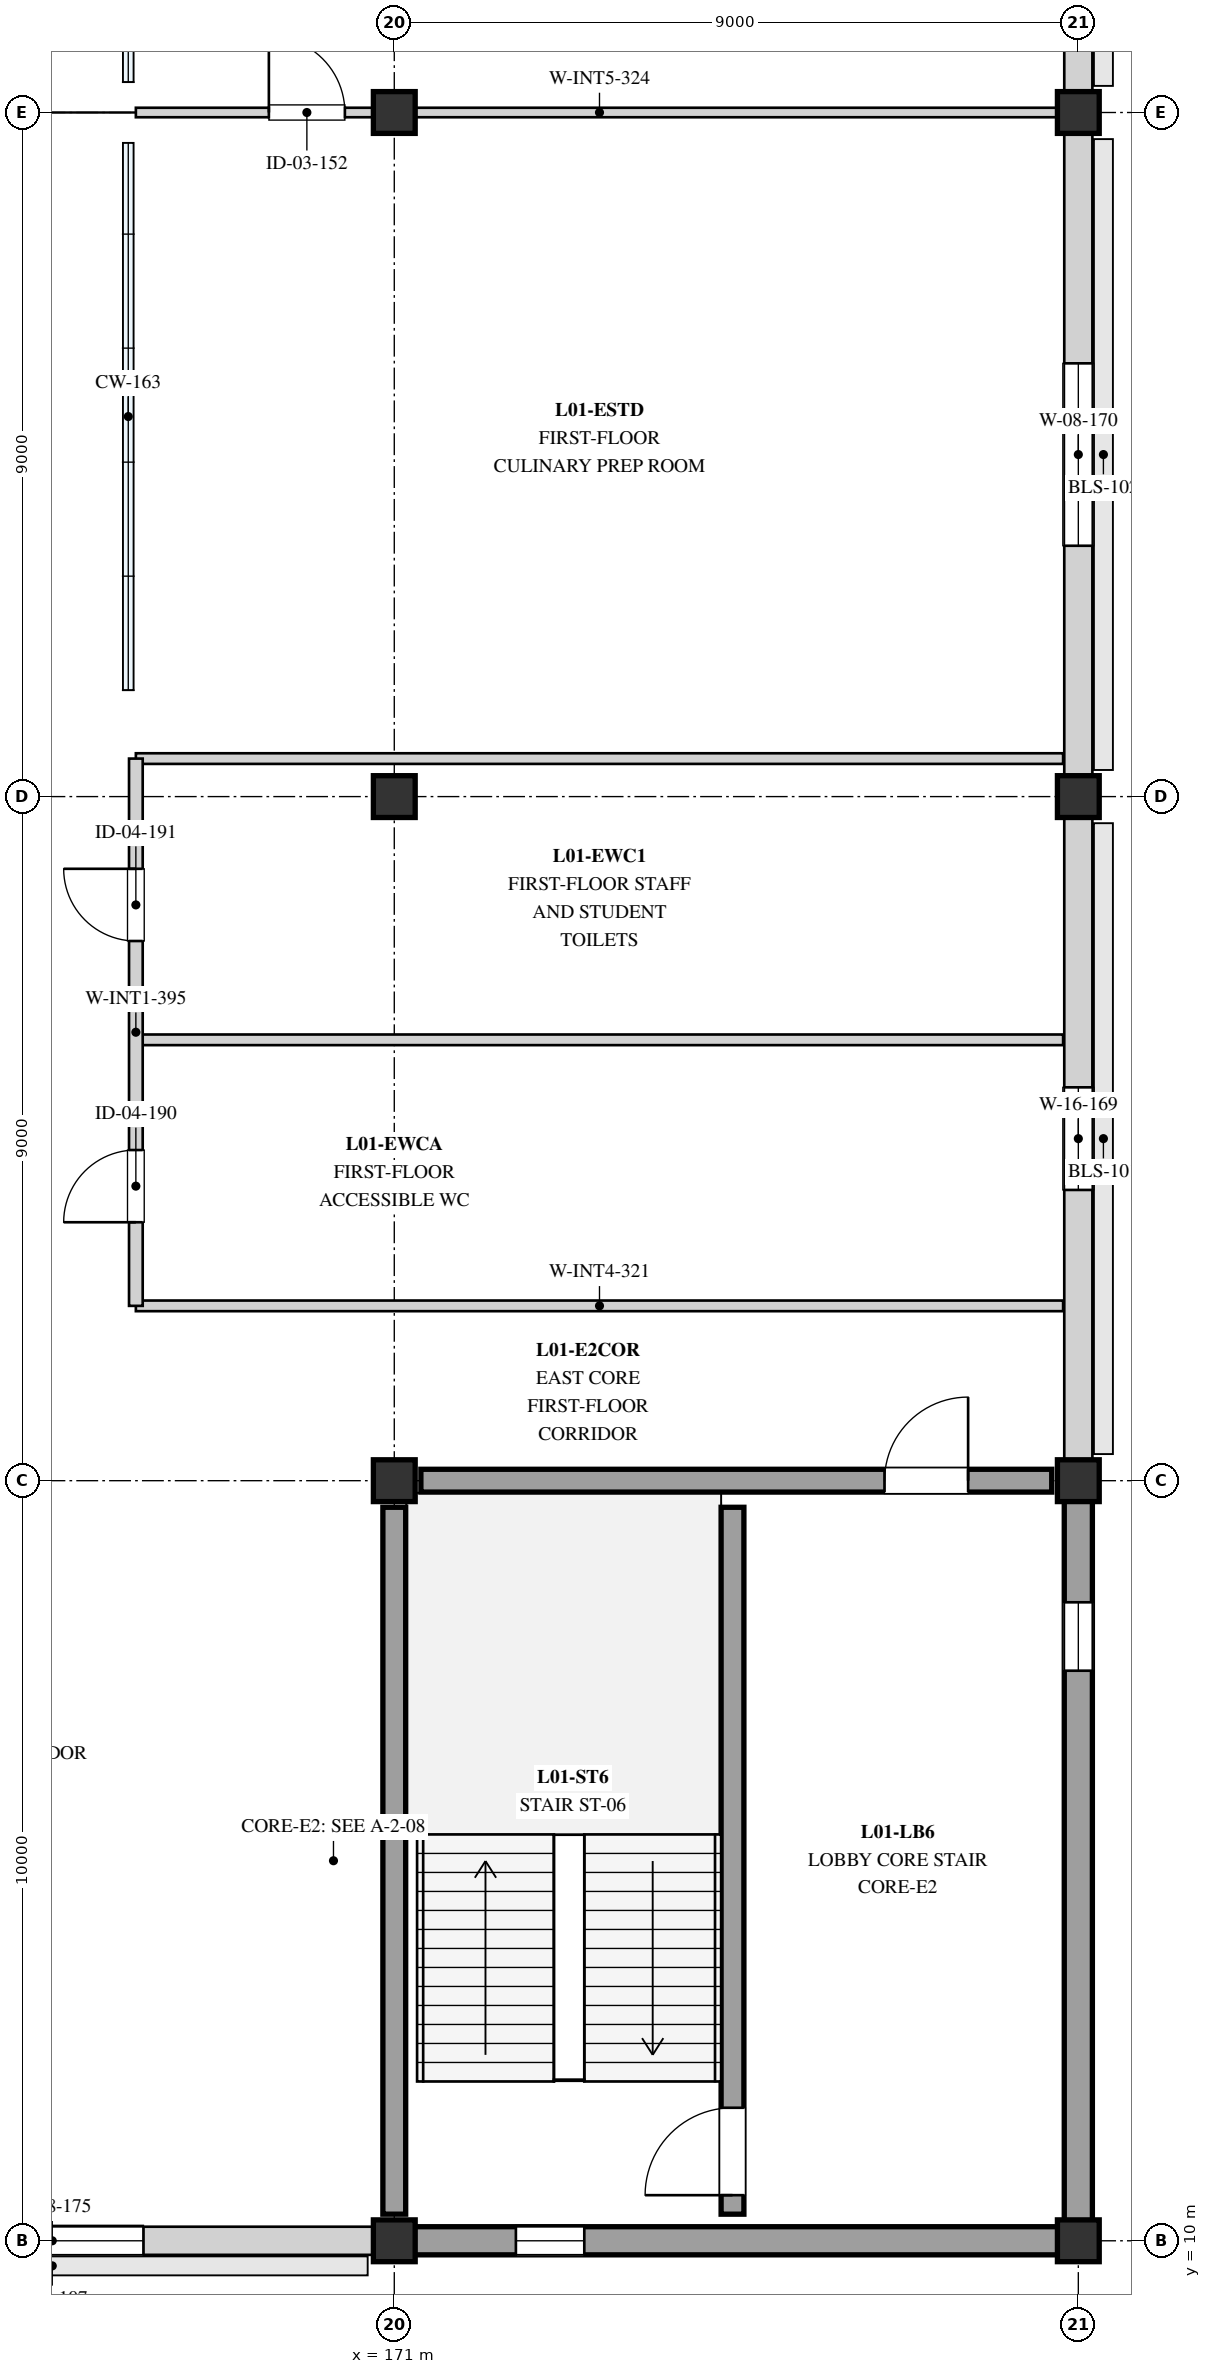
"""IFC4 building model, lengths in metres.
Left out: names, types, materials, properties, quantities, classifications, styles, units other than length and angle.
Written with IfcOpenShell. Run it as: python <this file> out.ifc"""

import sys

from ifc_helpers import new_model, si_unit, direction, frame, frame_2d, origin, origin_2d, place, context, subcontext, project, spatial, rectangle, extrude, element, fill, save


model = new_model("IFC4")
c1 = context("Model", 3, precision=1e-05, world=origin(), true_north=direction((0.0, 1.0)))
c2 = subcontext(c1, "Body", "Model", "MODEL_VIEW")
j1 = project(units=[si_unit("LENGTHUNIT", "METRE"), si_unit("PLANEANGLEUNIT", "RADIAN")], contexts=[c1])
p1 = place(None, origin())
s1 = spatial("IfcSite", under=j1, at=p1, CompositionType="ELEMENT")
p2 = place(p1, origin())
s2 = spatial("IfcBuilding", under=s1, at=p2, CompositionType="ELEMENT")
p3 = place(p2, frame((0.0, 0.0, 4.5)))
s3 = spatial("IfcBuildingStorey", under=s2, at=p3, CompositionType="ELEMENT", Elevation=4.5)
for number, where, z_axis, x_axis in (
    (1, (171.0, 10.0, 0.0), (0.0, 0.0, 1.0), (1.0, 0.0, 0.0)),
    (2, (171.0, 20.0, 0.0), (0.0, 0.0, 1.0), (1.0, 0.0, 0.0)),
    (3, (171.0, 29.0, 0.0), (0.0, 0.0, 1.0), (1.0, 0.0, 0.0)),
    (4, (171.0, 38.0, 0.0), (0.0, 0.0, 1.0), (1.0, 0.0, 0.0)),
    (5, (180.0, 10.0, 0.0), (0.0, 0.0, 1.0), (1.0, 0.0, 0.0)),
    (6, (180.0, 20.0, 0.0), (0.0, 0.0, 1.0), (1.0, 0.0, 0.0)),
    (7, (180.0, 29.0, 0.0), (0.0, 0.0, 1.0), (1.0, 0.0, 0.0)),
    (8, (180.0, 38.0, 0.0), (0.0, 0.0, 1.0), (1.0, 0.0, 0.0)),
):
    element("IfcColumn", number, at=place(p3, frame(where, z_axis=z_axis, x_axis=x_axis)), inside=s3, PredefinedType="COLUMN", context=c2, shape_type="SweptSolid", body=[
        extrude(rectangle(XDim=0.55, YDim=0.55, at=origin_2d()), origin(), (0.0, 0.0, 1.0), 3.9),
    ])
p4 = place(p3, frame((180.0, 20.0, 0.0), z_axis=(0.0, 0.0, 1.0), x_axis=(0.0, -1.0, 0.0)))
e9 = element("IfcWall", 9, at=p4, inside=s3, PredefinedType="STANDARD", context=c2, shape_type="SweptSolid", body=[
    extrude(rectangle(XDim=10.0, YDim=0.37, at=frame_2d((5.0, 0.0))), origin(), (0.0, 0.0, 1.0), 3.65),
])
p5 = place(p4, frame((1.6, 0.0, 0.35)))
e10 = element("IfcOpeningElement", 10, at=p5, cuts=e9, PredefinedType="OPENING", context=c2, shape_type="SweptSolid", body=[
    extrude(rectangle(XDim=0.9, YDim=2.24, at=frame_2d((0.45, 1.12))), frame((0.0, 0.195, 0.0), z_axis=(0.0, -1.0, 0.0), x_axis=(1.0, 0.0, 0.0)), (0.0, 0.0, 1.0), 0.39),
])
p6 = place(p3, frame((180.0, 20.0, 0.0), z_axis=(0.0, 0.0, 1.0), x_axis=(0.0, 1.0, 0.0)))
e11 = element("IfcWall", 11, at=p6, inside=s3, PredefinedType="STANDARD", context=c2, shape_type="SweptSolid", body=[
    extrude(rectangle(XDim=9.0, YDim=0.37, at=frame_2d((4.5, 0.0))), origin(), (0.0, 0.0, 1.0), 2.78),
])
p7 = place(p6, frame((3.825, 0.0, 0.9)))
e12 = element("IfcOpeningElement", 12, at=p7, cuts=e11, PredefinedType="OPENING", context=c2, shape_type="SweptSolid", body=[
    extrude(rectangle(XDim=1.35, YDim=1.6, at=frame_2d((0.675, 0.8))), frame((0.0, 0.195, 0.0), z_axis=(0.0, -1.0, 0.0), x_axis=(1.0, 0.0, 0.0)), (0.0, 0.0, 1.0), 0.39),
])
p8 = place(p3, frame((180.0, 29.0, 0.0), z_axis=(0.0, 0.0, 1.0), x_axis=(0.0, 1.0, 0.0)))
e13 = element("IfcWall", 13, at=p8, inside=s3, PredefinedType="STANDARD", context=c2, shape_type="SweptSolid", body=[
    extrude(rectangle(XDim=9.0, YDim=0.37, at=frame_2d((4.5, 0.0))), origin(), (0.0, 0.0, 1.0), 2.78),
])
p9 = place(p8, frame((3.3, 0.0, 0.59)))
e14 = element("IfcOpeningElement", 14, at=p9, cuts=e13, PredefinedType="OPENING", context=c2, shape_type="SweptSolid", body=[
    extrude(rectangle(XDim=2.4, YDim=2.0, at=frame_2d((1.2, 1.0))), frame((0.0, 0.195, 0.0), z_axis=(0.0, -1.0, 0.0), x_axis=(1.0, 0.0, 0.0)), (0.0, 0.0, 1.0), 0.39),
])
p10 = place(p3, frame((180.0, 38.0, 0.0), z_axis=(0.0, 0.0, 1.0), x_axis=(0.0, 1.0, 0.0)))
e15 = element("IfcWall", 15, at=p10, inside=s3, PredefinedType="STANDARD", context=c2, shape_type="SweptSolid", body=[
    extrude(rectangle(XDim=9.0, YDim=0.37, at=frame_2d((4.5, 0.0))), origin(), (0.0, 0.0, 1.0), 2.78),
])
p11 = place(p10, frame((3.6, 0.0, 0.59)))
e16 = element("IfcOpeningElement", 16, at=p11, cuts=e15, PredefinedType="OPENING", context=c2, shape_type="SweptSolid", body=[
    extrude(rectangle(XDim=1.8, YDim=2.0, at=frame_2d((0.9, 1.0))), frame((0.0, 0.195, 0.0), z_axis=(0.0, -1.0, 0.0), x_axis=(1.0, 0.0, 0.0)), (0.0, 0.0, 1.0), 0.39),
])
p12 = place(p3, frame((162.0, 10.0, 0.0), z_axis=(0.0, 0.0, 1.0), x_axis=(1.0, 0.0, 0.0)))
e17 = element("IfcWall", 17, at=p12, inside=s3, PredefinedType="STANDARD", context=c2, shape_type="SweptSolid", body=[
    extrude(rectangle(XDim=9.0, YDim=0.37, at=frame_2d((4.5, 0.0))), origin(), (0.0, 0.0, 1.0), 2.78),
])
p13 = place(p12, frame((3.3, 0.0, 0.59)))
e18 = element("IfcOpeningElement", 18, at=p13, cuts=e17, PredefinedType="OPENING", context=c2, shape_type="SweptSolid", body=[
    extrude(rectangle(XDim=2.4, YDim=2.0, at=frame_2d((1.2, 1.0))), frame((0.0, 0.195, 0.0), z_axis=(0.0, -1.0, 0.0), x_axis=(1.0, 0.0, 0.0)), (0.0, 0.0, 1.0), 0.39),
])
p14 = place(p3, frame((171.0, 10.0, 0.0), z_axis=(0.0, 0.0, 1.0), x_axis=(1.0, 0.0, 0.0)))
e19 = element("IfcWall", 19, at=p14, inside=s3, PredefinedType="STANDARD", context=c2, shape_type="SweptSolid", body=[
    extrude(rectangle(XDim=9.0, YDim=0.37, at=frame_2d((4.5, 0.0))), origin(), (0.0, 0.0, 1.0), 3.65),
])
p15 = place(p14, frame((1.6, 0.0, 0.35)))
e20 = element("IfcOpeningElement", 20, at=p15, cuts=e19, PredefinedType="OPENING", context=c2, shape_type="SweptSolid", body=[
    extrude(rectangle(XDim=0.9, YDim=2.24, at=frame_2d((0.45, 1.12))), frame((0.0, 0.195, 0.0), z_axis=(0.0, -1.0, 0.0), x_axis=(1.0, 0.0, 0.0)), (0.0, 0.0, 1.0), 0.39),
])
p16 = place(p3, frame((175.45, 10.35, 0.0), z_axis=(0.0, 0.0, 1.0), x_axis=(0.0, 1.0, 0.0)))
e21 = element("IfcWall", 21, at=p16, inside=s3, PredefinedType="SHEAR", context=c2, shape_type="SweptSolid", body=[
    extrude(rectangle(XDim=9.3, YDim=0.3, at=frame_2d((4.65, 0.0))), origin(), (0.0, 0.0, 1.0), 3.62),
])
p17 = place(p16, frame((0.25, 0.0, 0.0)))
e22 = element("IfcOpeningElement", 22, at=p17, cuts=e21, PredefinedType="OPENING", context=c2, shape_type="SweptSolid", body=[
    extrude(rectangle(XDim=1.15, YDim=2.15, at=frame_2d((0.575, 1.075))), frame((0.0, 0.16, 0.0), z_axis=(0.0, -1.0, 0.0), x_axis=(1.0, 0.0, 0.0)), (0.0, 0.0, 1.0), 0.32),
])
p18 = place(p3, frame((171.0, 10.35, 0.0), z_axis=(0.0, 0.0, 1.0), x_axis=(0.0, 1.0, 0.0)))
e23 = element("IfcWall", 23, at=p18, inside=s3, PredefinedType="SHEAR", context=c2, shape_type="SweptSolid", body=[
    extrude(rectangle(XDim=9.3, YDim=0.3, at=frame_2d((4.65, 0.0))), origin(), (0.0, 0.0, 1.0), 3.62),
])
p19 = place(p3, frame((171.35, 20.0, 0.0), z_axis=(0.0, 0.0, 1.0), x_axis=(1.0, 0.0, 0.0)))
e24 = element("IfcWall", 24, at=p19, inside=s3, PredefinedType="SHEAR", context=c2, shape_type="SweptSolid", body=[
    extrude(rectangle(XDim=8.3, YDim=0.3, at=frame_2d((4.15, 0.0))), origin(), (0.0, 0.0, 1.0), 3.62),
])
p20 = place(p19, frame((6.1, 0.0, 0.0)))
e25 = element("IfcOpeningElement", 25, at=p20, cuts=e24, PredefinedType="OPENING", context=c2, shape_type="SweptSolid", body=[
    extrude(rectangle(XDim=1.1, YDim=2.1, at=frame_2d((0.55, 1.05))), frame((0.0, 0.16, 0.0), z_axis=(0.0, -1.0, 0.0), x_axis=(1.0, 0.0, 0.0)), (0.0, 0.0, 1.0), 0.32),
])
for number, where, z_axis, x_axis in (
    (26, (167.6, 22.3, 0.0), (0.0, 0.0, 1.0), (1.0, 0.0, 0.0)),
    (27, (167.6, 25.8, 0.0), (0.0, 0.0, 1.0), (1.0, 0.0, 0.0)),
    (28, (167.6, 29.5, 0.0), (0.0, 0.0, 1.0), (1.0, 0.0, 0.0)),
):
    element("IfcWall", number, at=place(p3, frame(where, z_axis=z_axis, x_axis=x_axis)), inside=s3, PredefinedType="PARTITIONING", context=c2, shape_type="SweptSolid", body=[
        extrude(rectangle(XDim=12.2, YDim=0.14, at=frame_2d((6.1, 0.0))), origin(), (0.0, 0.0, 1.0), 2.65),
    ])
p21 = place(p3, frame((167.6, 38.0, 0.0), z_axis=(0.0, 0.0, 1.0), x_axis=(1.0, 0.0, 0.0)))
e29 = element("IfcWall", 29, at=p21, inside=s3, PredefinedType="PARTITIONING", context=c2, shape_type="SweptSolid", body=[
    extrude(rectangle(XDim=12.2, YDim=0.125, at=frame_2d((6.1, 0.0))), origin(), (0.0, 0.0, 1.0), 2.65),
])
p22 = place(p21, frame((1.75, 0.0, 0.0)))
e30 = element("IfcOpeningElement", 30, at=p22, cuts=e29, PredefinedType="OPENING", context=c2, shape_type="SweptSolid", body=[
    extrude(rectangle(XDim=1.0, YDim=2.1, at=frame_2d((0.5, 1.05))), frame((0.0, 0.073, 0.0), z_axis=(0.0, -1.0, 0.0), x_axis=(1.0, 0.0, 0.0)), (0.0, 0.0, 1.0), 0.145),
])
p23 = place(p3, frame((167.6, 22.3, 0.0), z_axis=(0.0, 0.0, 1.0), x_axis=(0.0, 1.0, 0.0)))
e31 = element("IfcWall", 31, at=p23, inside=s3, PredefinedType="STANDARD", context=c2, shape_type="SweptSolid", body=[
    extrude(rectangle(XDim=7.2, YDim=0.18, at=frame_2d((3.6, 0.0))), origin(), (0.0, 0.0, 1.0), 2.65),
])
p24 = place(p23, frame((1.1, 0.0, 0.0)))
e32 = element("IfcOpeningElement", 32, at=p24, cuts=e31, PredefinedType="OPENING", context=c2, shape_type="SweptSolid", body=[
    extrude(rectangle(XDim=0.95, YDim=2.1, at=frame_2d((0.475, 1.05))), frame((0.0, 0.1, 0.0), z_axis=(0.0, -1.0, 0.0), x_axis=(1.0, 0.0, 0.0)), (0.0, 0.0, 1.0), 0.2),
])
p25 = place(p23, frame((4.8, 0.0, 0.0)))
e33 = element("IfcOpeningElement", 33, at=p25, cuts=e31, PredefinedType="OPENING", context=c2, shape_type="SweptSolid", body=[
    extrude(rectangle(XDim=0.95, YDim=2.1, at=frame_2d((0.475, 1.05))), frame((0.0, 0.1, 0.0), z_axis=(0.0, -1.0, 0.0), x_axis=(1.0, 0.0, 0.0)), (0.0, 0.0, 1.0), 0.2),
])
p26 = place(p5, origin())
e34 = element("IfcWindow", 34, at=p26, inside=s3, PartitioningType="SINGLE_PANEL", PredefinedType="WINDOW", context=c2, shape_type="SweptSolid", body=[
    extrude(rectangle(XDim=0.9, YDim=2.24, at=frame_2d((0.45, 1.12))), frame((0.0, 0.03, 0.0), z_axis=(0.0, -1.0, 0.0), x_axis=(1.0, 0.0, 0.0)), (0.0, 0.0, 1.0), 0.06),
])
fill(e10, e34)
p27 = place(p7, origin())
e35 = element("IfcWindow", 35, at=p27, inside=s3, PartitioningType="SINGLE_PANEL", PredefinedType="WINDOW", context=c2, shape_type="SweptSolid", body=[
    extrude(rectangle(XDim=1.35, YDim=1.6, at=frame_2d((0.675, 0.8))), frame((0.0, 0.03, 0.0), z_axis=(0.0, -1.0, 0.0), x_axis=(1.0, 0.0, 0.0)), (0.0, 0.0, 1.0), 0.06),
])
fill(e12, e35)
p28 = place(p9, origin())
e36 = element("IfcWindow", 36, at=p28, inside=s3, PartitioningType="SINGLE_PANEL", PredefinedType="WINDOW", context=c2, shape_type="SweptSolid", body=[
    extrude(rectangle(XDim=2.4, YDim=2.0, at=frame_2d((1.2, 1.0))), frame((0.0, 0.03, 0.0), z_axis=(0.0, -1.0, 0.0), x_axis=(1.0, 0.0, 0.0)), (0.0, 0.0, 1.0), 0.06),
])
fill(e14, e36)
p29 = place(p13, origin())
e37 = element("IfcWindow", 37, at=p29, inside=s3, PartitioningType="SINGLE_PANEL", PredefinedType="WINDOW", context=c2, shape_type="SweptSolid", body=[
    extrude(rectangle(XDim=2.4, YDim=2.0, at=frame_2d((1.2, 1.0))), frame((0.0, 0.03, 0.0), z_axis=(0.0, -1.0, 0.0), x_axis=(1.0, 0.0, 0.0)), (0.0, 0.0, 1.0), 0.06),
])
fill(e18, e37)
p30 = place(p15, origin())
e38 = element("IfcWindow", 38, at=p30, inside=s3, PartitioningType="SINGLE_PANEL", PredefinedType="WINDOW", context=c2, shape_type="SweptSolid", body=[
    extrude(rectangle(XDim=0.9, YDim=2.24, at=frame_2d((0.45, 1.12))), frame((0.0, 0.03, 0.0), z_axis=(0.0, -1.0, 0.0), x_axis=(1.0, 0.0, 0.0)), (0.0, 0.0, 1.0), 0.06),
])
fill(e20, e38)
p31 = place(p17, origin())
e39 = element("IfcDoor", 39, at=p31, inside=s3, OperationType="SINGLE_SWING_LEFT", PredefinedType="DOOR", context=c2, shape_type="SweptSolid", body=[
    extrude(rectangle(XDim=1.15, YDim=2.15, at=frame_2d((0.575, 1.075))), frame((0.0, 0.025, 0.0), z_axis=(0.0, -1.0, 0.0), x_axis=(1.0, 0.0, 0.0)), (0.0, 0.0, 1.0), 0.05),
])
fill(e22, e39)
p32 = place(p20, origin())
e40 = element("IfcDoor", 40, at=p32, inside=s3, OperationType="SINGLE_SWING_RIGHT", PredefinedType="DOOR", context=c2, shape_type="SweptSolid", body=[
    extrude(rectangle(XDim=1.1, YDim=2.1, at=frame_2d((0.55, 1.05))), frame((0.0, 0.025, 0.0), z_axis=(0.0, -1.0, 0.0), x_axis=(1.0, 0.0, 0.0)), (0.0, 0.0, 1.0), 0.05),
])
fill(e25, e40)
p33 = place(p22, origin())
e41 = element("IfcDoor", 41, at=p33, inside=s3, OperationType="SINGLE_SWING_LEFT", PredefinedType="DOOR", context=c2, shape_type="SweptSolid", body=[
    extrude(rectangle(XDim=1.0, YDim=2.1, at=frame_2d((0.5, 1.05))), frame((0.0, 0.025, 0.0), z_axis=(0.0, -1.0, 0.0), x_axis=(1.0, 0.0, 0.0)), (0.0, 0.0, 1.0), 0.05),
])
fill(e30, e41)
p34 = place(p24, origin())
e42 = element("IfcDoor", 42, at=p34, inside=s3, OperationType="SINGLE_SWING_LEFT", PredefinedType="DOOR", context=c2, shape_type="SweptSolid", body=[
    extrude(rectangle(XDim=0.95, YDim=2.1, at=frame_2d((0.475, 1.05))), frame((0.0, 0.025, 0.0), z_axis=(0.0, -1.0, 0.0), x_axis=(1.0, 0.0, 0.0)), (0.0, 0.0, 1.0), 0.05),
])
fill(e32, e42)
p35 = place(p25, origin())
e43 = element("IfcDoor", 43, at=p35, inside=s3, OperationType="SINGLE_SWING_RIGHT", PredefinedType="DOOR", context=c2, shape_type="SweptSolid", body=[
    extrude(rectangle(XDim=0.95, YDim=2.1, at=frame_2d((0.475, 1.05))), frame((0.0, 0.025, 0.0), z_axis=(0.0, -1.0, 0.0), x_axis=(1.0, 0.0, 0.0)), (0.0, 0.0, 1.0), 0.05),
])
fill(e33, e43)
save(model, sys.argv[1])
